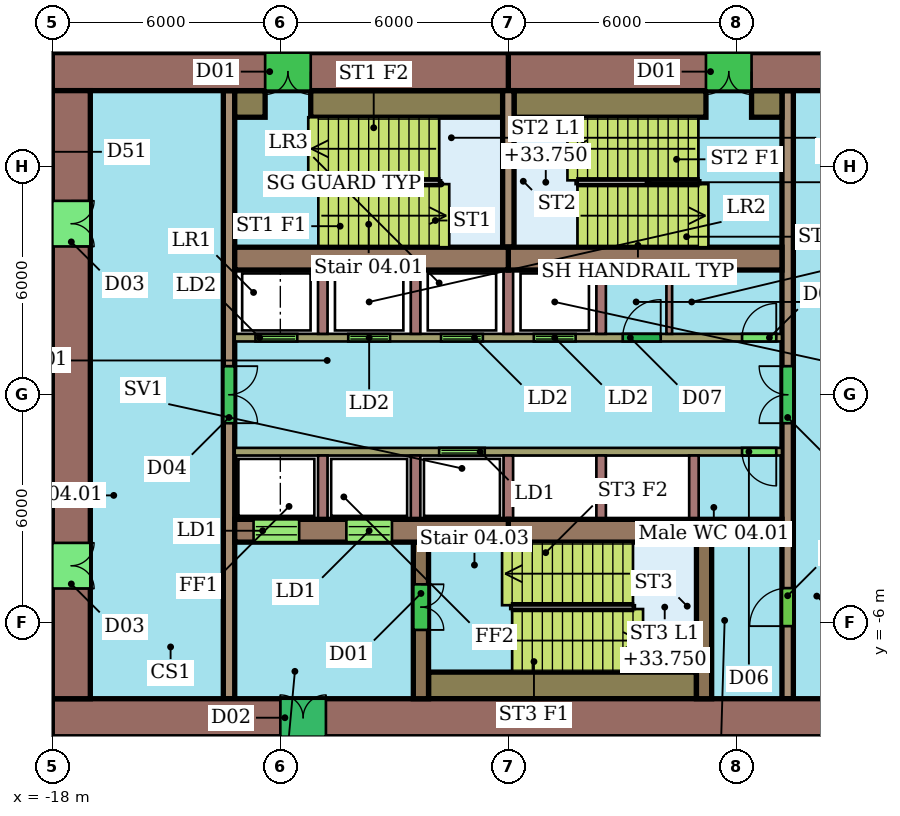
"""IFC4 building model, lengths in metres.
Left out: names, types, materials, properties, quantities, classifications, styles, units other than length and angle.
Written with IfcOpenShell. Run it as: python <this file> out.ifc"""

import sys

from ifc_helpers import new_model, si_unit, direction, frame, frame_2d, origin, place, context, subcontext, project, spatial, rectangle, extrude, element, fill, save


model = new_model("IFC4")
c1 = context("Model", 3, precision=1e-05, world=origin(), true_north=direction((0.0, 1.0)))
c2 = subcontext(c1, "Body", "Model", "MODEL_VIEW")
j1 = project(units=[si_unit("LENGTHUNIT", "METRE"), si_unit("PLANEANGLEUNIT", "RADIAN")], contexts=[c1])
p1 = place(None, origin())
s1 = spatial("IfcSite", under=j1, at=p1, CompositionType="ELEMENT")
p2 = place(p1, origin())
s2 = spatial("IfcBuilding", under=s1, at=p2, CompositionType="ELEMENT")
p3 = place(p2, frame((0.0, 0.0, 31.5)))
s3 = spatial("IfcBuildingStorey", under=s2, at=p3, CompositionType="ELEMENT", Elevation=31.5)
p4 = place(p3, frame((6.0, 8.5, 0.0), z_axis=(0.0, 0.0, 1.0), x_axis=(-1.0, 0.0, 0.0)))
e1 = element("IfcWall", 1, at=p4, inside=s3, PredefinedType="SHEAR", context=c2, shape_type="SweptSolid", body=[
    extrude(rectangle(XDim=12.0, YDim=1.0, at=frame_2d((6.0, 0.0))), origin(), (0.0, 0.0, 1.0), 4.2),
])
p5 = place(p4, frame((5.6, 0.0, 0.0)))
e2 = element("IfcOpeningElement", 2, at=p5, cuts=e1, PredefinedType="OPENING", context=c2, shape_type="SweptSolid", body=[
    extrude(rectangle(XDim=1.2, YDim=2.1, at=frame_2d((0.6, 1.05))), frame((0.0, 0.51, 0.0), z_axis=(0.0, -1.0, 0.0), x_axis=(1.0, 0.0, 0.0)), (0.0, 0.0, 1.0), 1.02),
])
p6 = place(p3, frame((-6.0, 8.5, 0.0), z_axis=(0.0, 0.0, 1.0), x_axis=(-1.0, 0.0, 0.0)))
e3 = element("IfcWall", 3, at=p6, inside=s3, PredefinedType="SHEAR", context=c2, shape_type="SweptSolid", body=[
    extrude(rectangle(XDim=12.0, YDim=1.0, at=frame_2d((6.0, 0.0))), origin(), (0.0, 0.0, 1.0), 4.2),
])
p7 = place(p6, frame((5.2, 0.0, 0.0)))
e4 = element("IfcOpeningElement", 4, at=p7, cuts=e3, PredefinedType="OPENING", context=c2, shape_type="SweptSolid", body=[
    extrude(rectangle(XDim=1.2, YDim=2.1, at=frame_2d((0.6, 1.05))), frame((0.0, 0.51, 0.0), z_axis=(0.0, -1.0, 0.0), x_axis=(1.0, 0.0, 0.0)), (0.0, 0.0, 1.0), 1.02),
])
p8 = place(p3, frame((-18.0, -8.5, 0.0), z_axis=(0.0, 0.0, 1.0), x_axis=(1.0, 0.0, 0.0)))
e5 = element("IfcWall", 5, at=p8, inside=s3, PredefinedType="SHEAR", context=c2, shape_type="SweptSolid", body=[
    extrude(rectangle(XDim=24.0, YDim=1.0, at=frame_2d((12.0, 0.0))), origin(), (0.0, 0.0, 1.0), 4.2),
])
p9 = place(p8, frame((6.0, 0.0, 0.0)))
e6 = element("IfcOpeningElement", 6, at=p9, cuts=e5, PredefinedType="OPENING", context=c2, shape_type="SweptSolid", body=[
    extrude(rectangle(XDim=1.2, YDim=2.1, at=frame_2d((0.6, 1.05))), frame((0.0, 0.51, 0.0), z_axis=(0.0, -1.0, 0.0), x_axis=(1.0, 0.0, 0.0)), (0.0, 0.0, 1.0), 1.02),
])
p10 = place(p3, frame((-17.5, 8.0, 0.0), z_axis=(0.0, 0.0, 1.0), x_axis=(0.0, -1.0, 0.0)))
e7 = element("IfcWall", 7, at=p10, inside=s3, PredefinedType="SHEAR", context=c2, shape_type="SweptSolid", body=[
    extrude(rectangle(XDim=16.0, YDim=1.0, at=frame_2d((8.0, 0.0))), origin(), (0.0, 0.0, 1.0), 4.2),
])
p11 = place(p10, frame((11.9, 0.0, 0.0)))
e8 = element("IfcOpeningElement", 8, at=p11, cuts=e7, PredefinedType="OPENING", context=c2, shape_type="SweptSolid", body=[
    extrude(rectangle(XDim=1.2, YDim=2.1, at=frame_2d((0.6, 1.05))), frame((0.0, 0.51, 0.0), z_axis=(0.0, -1.0, 0.0), x_axis=(1.0, 0.0, 0.0)), (0.0, 0.0, 1.0), 1.02),
])
p12 = place(p10, frame((2.9, 0.0, 0.0)))
e9 = element("IfcOpeningElement", 9, at=p12, cuts=e7, PredefinedType="OPENING", context=c2, shape_type="SweptSolid", body=[
    extrude(rectangle(XDim=1.2, YDim=2.1, at=frame_2d((0.6, 1.05))), frame((0.0, 0.51, 0.0), z_axis=(0.0, -1.0, 0.0), x_axis=(1.0, 0.0, 0.0)), (0.0, 0.0, 1.0), 1.02),
])
for number, where, z_axis, x_axis in (
    (10, (-13.2, 3.58, 0.0), (0.0, 0.0, 1.0), (1.0, 0.0, 0.0)),
    (11, (-6.0, 3.58, 0.0), (0.0, 0.0, 1.0), (1.0, 0.0, 0.0)),
):
    element("IfcWall", number, at=place(p3, frame(where, z_axis=z_axis, x_axis=x_axis)), inside=s3, PredefinedType="SHEAR", context=c2, shape_type="SweptSolid", body=[
        extrude(rectangle(XDim=7.2, YDim=0.6, at=frame_2d((3.6, 0.0))), origin(), (0.0, 0.0, 1.0), 4.2),
    ])
p13 = place(p3, frame((-13.2, -3.58, 0.0), z_axis=(0.0, 0.0, 1.0), x_axis=(1.0, 0.0, 0.0)))
e12 = element("IfcWall", 12, at=p13, inside=s3, PredefinedType="SHEAR", context=c2, shape_type="SweptSolid", body=[
    extrude(rectangle(XDim=7.2, YDim=0.6, at=frame_2d((3.6, 0.0))), origin(), (0.0, 0.0, 1.0), 4.2),
])
p14 = place(p13, frame((0.496, 0.0, 0.0)))
e13 = element("IfcOpeningElement", 13, at=p14, cuts=e12, PredefinedType="OPENING", context=c2, shape_type="SweptSolid", body=[
    extrude(rectangle(XDim=1.2, YDim=2.1, at=frame_2d((0.6, 1.05))), frame((0.0, 0.31, 0.0), z_axis=(0.0, -1.0, 0.0), x_axis=(1.0, 0.0, 0.0)), (0.0, 0.0, 1.0), 0.62),
])
p15 = place(p13, frame((2.938, 0.0, 0.0)))
e14 = element("IfcOpeningElement", 14, at=p15, cuts=e12, PredefinedType="OPENING", context=c2, shape_type="SweptSolid", body=[
    extrude(rectangle(XDim=1.2, YDim=2.1, at=frame_2d((0.6, 1.05))), frame((0.0, 0.31, 0.0), z_axis=(0.0, -1.0, 0.0), x_axis=(1.0, 0.0, 0.0)), (0.0, 0.0, 1.0), 0.62),
])
p16 = place(p3, frame((-6.0, -3.58, 0.0), z_axis=(0.0, 0.0, 1.0), x_axis=(1.0, 0.0, 0.0)))
e15 = element("IfcWall", 15, at=p16, inside=s3, PredefinedType="SHEAR", context=c2, shape_type="SweptSolid", body=[
    extrude(rectangle(XDim=7.2, YDim=0.6, at=frame_2d((3.6, 0.0))), origin(), (0.0, 0.0, 1.0), 4.2),
])
p17 = place(p3, frame((-13.35, 8.0, 0.0), z_axis=(0.0, 0.0, 1.0), x_axis=(0.0, -1.0, 0.0)))
e16 = element("IfcWall", 16, at=p17, inside=s3, PredefinedType="SHEAR", context=c2, shape_type="SweptSolid", body=[
    extrude(rectangle(XDim=16.0, YDim=0.3, at=frame_2d((8.0, 0.0))), origin(), (0.0, 0.0, 1.0), 4.2),
])
p18 = place(p17, frame((7.25, 0.0, 0.0)))
e17 = element("IfcOpeningElement", 17, at=p18, cuts=e16, PredefinedType="OPENING", context=c2, shape_type="SweptSolid", body=[
    extrude(rectangle(XDim=1.5, YDim=2.1, at=frame_2d((0.75, 1.05))), frame((0.0, 0.16, 0.0), z_axis=(0.0, -1.0, 0.0), x_axis=(1.0, 0.0, 0.0)), (0.0, 0.0, 1.0), 0.32),
])
p19 = place(p3, frame((1.35, -8.0, 0.0), z_axis=(0.0, 0.0, 1.0), x_axis=(0.0, 1.0, 0.0)))
e18 = element("IfcWall", 18, at=p19, inside=s3, PredefinedType="SHEAR", context=c2, shape_type="SweptSolid", body=[
    extrude(rectangle(XDim=16.0, YDim=0.3, at=frame_2d((8.0, 0.0))), origin(), (0.0, 0.0, 1.0), 4.2),
])
p20 = place(p19, frame((1.91, 0.0, 0.0)))
e19 = element("IfcOpeningElement", 19, at=p20, cuts=e18, PredefinedType="OPENING", context=c2, shape_type="SweptSolid", body=[
    extrude(rectangle(XDim=1.0, YDim=2.1, at=frame_2d((0.5, 1.05))), frame((0.0, 0.16, 0.0), z_axis=(0.0, -1.0, 0.0), x_axis=(1.0, 0.0, 0.0)), (0.0, 0.0, 1.0), 0.32),
])
p21 = place(p19, frame((7.25, 0.0, 0.0)))
e20 = element("IfcOpeningElement", 20, at=p21, cuts=e18, PredefinedType="OPENING", context=c2, shape_type="SweptSolid", body=[
    extrude(rectangle(XDim=1.5, YDim=2.1, at=frame_2d((0.75, 1.05))), frame((0.0, 0.16, 0.0), z_axis=(0.0, -1.0, 0.0), x_axis=(1.0, 0.0, 0.0)), (0.0, 0.0, 1.0), 0.32),
])
p22 = place(p3, frame((-13.2, 1.5, 0.0), z_axis=(0.0, 0.0, 1.0), x_axis=(1.0, 0.0, 0.0)))
e21 = element("IfcWall", 21, at=p22, inside=s3, PredefinedType="SHEAR", context=c2, shape_type="SweptSolid", body=[
    extrude(rectangle(XDim=14.4, YDim=0.2, at=frame_2d((7.2, 0.0))), origin(), (0.0, 0.0, 1.0), 4.2),
])
p23 = place(p22, frame((0.546, 0.0, 0.0)))
e22 = element("IfcOpeningElement", 22, at=p23, cuts=e21, PredefinedType="OPENING", context=c2, shape_type="SweptSolid", body=[
    extrude(rectangle(XDim=1.1, YDim=2.1, at=frame_2d((0.55, 1.05))), frame((0.0, 0.11, 0.0), z_axis=(0.0, -1.0, 0.0), x_axis=(1.0, 0.0, 0.0)), (0.0, 0.0, 1.0), 0.22),
])
p24 = place(p22, frame((2.988, 0.0, 0.0)))
e23 = element("IfcOpeningElement", 23, at=p24, cuts=e21, PredefinedType="OPENING", context=c2, shape_type="SweptSolid", body=[
    extrude(rectangle(XDim=1.1, YDim=2.1, at=frame_2d((0.55, 1.05))), frame((0.0, 0.11, 0.0), z_axis=(0.0, -1.0, 0.0), x_axis=(1.0, 0.0, 0.0)), (0.0, 0.0, 1.0), 0.22),
])
p25 = place(p22, frame((5.429, 0.0, 0.0)))
e24 = element("IfcOpeningElement", 24, at=p25, cuts=e21, PredefinedType="OPENING", context=c2, shape_type="SweptSolid", body=[
    extrude(rectangle(XDim=1.1, YDim=2.1, at=frame_2d((0.55, 1.05))), frame((0.0, 0.11, 0.0), z_axis=(0.0, -1.0, 0.0), x_axis=(1.0, 0.0, 0.0)), (0.0, 0.0, 1.0), 0.22),
])
p26 = place(p22, frame((7.871, 0.0, 0.0)))
e25 = element("IfcOpeningElement", 25, at=p26, cuts=e21, PredefinedType="OPENING", context=c2, shape_type="SweptSolid", body=[
    extrude(rectangle(XDim=1.1, YDim=2.1, at=frame_2d((0.55, 1.05))), frame((0.0, 0.11, 0.0), z_axis=(0.0, -1.0, 0.0), x_axis=(1.0, 0.0, 0.0)), (0.0, 0.0, 1.0), 0.22),
])
p27 = place(p22, frame((10.21, 0.0, 0.0)))
e26 = element("IfcOpeningElement", 26, at=p27, cuts=e21, PredefinedType="OPENING", context=c2, shape_type="SweptSolid", body=[
    extrude(rectangle(XDim=1.0, YDim=2.1, at=frame_2d((0.5, 1.05))), frame((0.0, 0.11, 0.0), z_axis=(0.0, -1.0, 0.0), x_axis=(1.0, 0.0, 0.0)), (0.0, 0.0, 1.0), 0.22),
])
p28 = place(p22, frame((13.35, 0.0, 0.0)))
e27 = element("IfcOpeningElement", 27, at=p28, cuts=e21, PredefinedType="OPENING", context=c2, shape_type="SweptSolid", body=[
    extrude(rectangle(XDim=0.9, YDim=2.1, at=frame_2d((0.45, 1.05))), frame((0.0, 0.11, 0.0), z_axis=(0.0, -1.0, 0.0), x_axis=(1.0, 0.0, 0.0)), (0.0, 0.0, 1.0), 0.22),
])
p29 = place(p3, frame((1.2, -1.5, 0.0), z_axis=(0.0, 0.0, 1.0), x_axis=(-1.0, 0.0, 0.0)))
e28 = element("IfcWall", 28, at=p29, inside=s3, PredefinedType="SHEAR", context=c2, shape_type="SweptSolid", body=[
    extrude(rectangle(XDim=14.4, YDim=0.2, at=frame_2d((7.2, 0.0))), origin(), (0.0, 0.0, 1.0), 4.2),
])
p30 = place(p29, frame((7.821, 0.0, 0.0)))
e29 = element("IfcOpeningElement", 29, at=p30, cuts=e28, PredefinedType="OPENING", context=c2, shape_type="SweptSolid", body=[
    extrude(rectangle(XDim=1.2, YDim=2.1, at=frame_2d((0.6, 1.05))), frame((0.0, 0.11, 0.0), z_axis=(0.0, -1.0, 0.0), x_axis=(1.0, 0.0, 0.0)), (0.0, 0.0, 1.0), 0.22),
])
p31 = place(p29, frame((0.15, 0.0, 0.0)))
e30 = element("IfcOpeningElement", 30, at=p31, cuts=e28, PredefinedType="OPENING", context=c2, shape_type="SweptSolid", body=[
    extrude(rectangle(XDim=0.9, YDim=2.1, at=frame_2d((0.45, 1.05))), frame((0.0, 0.11, 0.0), z_axis=(0.0, -1.0, 0.0), x_axis=(1.0, 0.0, 0.0)), (0.0, 0.0, 1.0), 0.22),
])
p32 = place(p3, frame((-8.3, -3.88, 0.0), z_axis=(0.0, 0.0, 1.0), x_axis=(0.0, -1.0, 0.0)))
e31 = element("IfcWall", 31, at=p32, inside=s3, PredefinedType="SHEAR", context=c2, shape_type="SweptSolid", body=[
    extrude(rectangle(XDim=4.12, YDim=0.4, at=frame_2d((2.06, 0.0))), origin(), (0.0, 0.0, 1.0), 4.2),
])
p33 = place(p32, frame((1.11, 0.0, 0.0)))
e32 = element("IfcOpeningElement", 32, at=p33, cuts=e31, PredefinedType="OPENING", context=c2, shape_type="SweptSolid", body=[
    extrude(rectangle(XDim=1.2, YDim=2.1, at=frame_2d((0.6, 1.05))), frame((0.0, 0.21, 0.0), z_axis=(0.0, -1.0, 0.0), x_axis=(1.0, 0.0, 0.0)), (0.0, 0.0, 1.0), 0.42),
])
p34 = place(p3, frame((-0.85, -3.88, 0.0), z_axis=(0.0, 0.0, 1.0), x_axis=(0.0, -1.0, 0.0)))
e33 = element("IfcWall", 33, at=p34, inside=s3, PredefinedType="SHEAR", context=c2, shape_type="SweptSolid", body=[
    extrude(rectangle(XDim=4.12, YDim=0.4, at=frame_2d((2.06, 0.0))), origin(), (0.0, 0.0, 1.0), 4.2),
])
p35 = place(p3, frame((-6.0, 3.88, 0.0), z_axis=(0.0, 0.0, 1.0), x_axis=(0.0, 1.0, 0.0)))
e34 = element("IfcWall", 34, at=p35, inside=s3, PredefinedType="SHEAR", context=c2, shape_type="SweptSolid", body=[
    extrude(rectangle(XDim=4.12, YDim=0.3, at=frame_2d((2.06, 0.0))), origin(), (0.0, 0.0, 1.0), 4.2),
])
p36 = place(p3, frame((-13.2, 7.65, 0.0), z_axis=(0.0, 0.0, 1.0), x_axis=(1.0, 0.0, 0.0)))
e35 = element("IfcWall", 35, at=p36, inside=s3, PredefinedType="SHEAR", context=c2, shape_type="SweptSolid", body=[
    extrude(rectangle(XDim=0.8, YDim=0.7, at=frame_2d((0.4, 0.0))), origin(), (0.0, 0.0, 1.0), 4.2),
])
for number, where, z_axis, x_axis in (
    (36, (-11.2, 7.65, 0.0), (0.0, 0.0, 1.0), (1.0, 0.0, 0.0)),
    (37, (-5.85, 7.65, 0.0), (0.0, 0.0, 1.0), (1.0, 0.0, 0.0)),
):
    element("IfcWall", number, at=place(p3, frame(where, z_axis=z_axis, x_axis=x_axis)), inside=s3, PredefinedType="SHEAR", context=c2, shape_type="SweptSolid", body=[
        extrude(rectangle(XDim=5.05, YDim=0.7, at=frame_2d((2.525, 0.0))), origin(), (0.0, 0.0, 1.0), 4.2),
    ])
p37 = place(p3, frame((0.4, 7.65, 0.0), z_axis=(0.0, 0.0, 1.0), x_axis=(1.0, 0.0, 0.0)))
e38 = element("IfcWall", 38, at=p37, inside=s3, PredefinedType="SHEAR", context=c2, shape_type="SweptSolid", body=[
    extrude(rectangle(XDim=0.8, YDim=0.7, at=frame_2d((0.4, 0.0))), origin(), (0.0, 0.0, 1.0), 4.2),
])
p38 = place(p3, frame((-8.1, -7.65, 0.0), z_axis=(0.0, 0.0, 1.0), x_axis=(1.0, 0.0, 0.0)))
e39 = element("IfcWall", 39, at=p38, inside=s3, PredefinedType="SHEAR", context=c2, shape_type="SweptSolid", body=[
    extrude(rectangle(XDim=7.05, YDim=0.7, at=frame_2d((3.525, 0.0))), origin(), (0.0, 0.0, 1.0), 4.2),
])
for number, where, z_axis, x_axis in (
    (40, (-10.883, 1.6, 0.0), (0.0, 0.0, 1.0), (0.0, 1.0, 0.0)),
    (41, (-8.442, 1.6, 0.0), (0.0, 0.0, 1.0), (0.0, 1.0, 0.0)),
    (42, (-6.0, 1.6, 0.0), (0.0, 0.0, 1.0), (0.0, 1.0, 0.0)),
    (43, (-3.558, 1.6, 0.0), (0.0, 0.0, 1.0), (0.0, 1.0, 0.0)),
):
    element("IfcWall", number, at=place(p3, frame(where, z_axis=z_axis, x_axis=x_axis)), inside=s3, PredefinedType="SHEAR", context=c2, shape_type="SweptSolid", body=[
        extrude(rectangle(XDim=1.68, YDim=0.25, at=frame_2d((0.84, 0.0))), origin(), (0.0, 0.0, 1.0), 4.2),
    ])
p39 = place(p3, frame((-1.765, 1.6, 0.0), z_axis=(0.0, 0.0, 1.0), x_axis=(0.0, 1.0, 0.0)))
e44 = element("IfcWall", 44, at=p39, inside=s3, PredefinedType="PARTITIONING", context=c2, shape_type="SweptSolid", body=[
    extrude(rectangle(XDim=1.68, YDim=0.15, at=frame_2d((0.84, 0.0))), origin(), (0.0, 0.0, 1.0), 4.2),
])
for number, where, z_axis, x_axis in (
    (45, (-10.883, -1.6, 0.0), (0.0, 0.0, 1.0), (0.0, -1.0, 0.0)),
    (46, (-8.442, -1.6, 0.0), (0.0, 0.0, 1.0), (0.0, -1.0, 0.0)),
    (47, (-6.0, -1.6, 0.0), (0.0, 0.0, 1.0), (0.0, -1.0, 0.0)),
    (48, (-3.558, -1.6, 0.0), (0.0, 0.0, 1.0), (0.0, -1.0, 0.0)),
    (49, (-1.117, -1.6, 0.0), (0.0, 0.0, 1.0), (0.0, -1.0, 0.0)),
):
    element("IfcWall", number, at=place(p3, frame(where, z_axis=z_axis, x_axis=x_axis)), inside=s3, PredefinedType="SHEAR", context=c2, shape_type="SweptSolid", body=[
        extrude(rectangle(XDim=1.68, YDim=0.25, at=frame_2d((0.84, 0.0))), origin(), (0.0, 0.0, 1.0), 4.2),
    ])
p40 = place(p5, origin())
e50 = element("IfcDoor", 50, at=p40, inside=s3, OperationType="DOUBLE_DOOR_SINGLE_SWING", PredefinedType="NOTDEFINED", context=c2, shape_type="SweptSolid", body=[
    extrude(rectangle(XDim=1.2, YDim=2.1, at=frame_2d((0.6, 1.05))), frame((0.0, 0.025, 0.0), z_axis=(0.0, -1.0, 0.0), x_axis=(1.0, 0.0, 0.0)), (0.0, 0.0, 1.0), 0.05),
])
fill(e2, e50)
p41 = place(p7, origin())
e51 = element("IfcDoor", 51, at=p41, inside=s3, OperationType="DOUBLE_DOOR_SINGLE_SWING", PredefinedType="NOTDEFINED", context=c2, shape_type="SweptSolid", body=[
    extrude(rectangle(XDim=1.2, YDim=2.1, at=frame_2d((0.6, 1.05))), frame((0.0, 0.025, 0.0), z_axis=(0.0, -1.0, 0.0), x_axis=(1.0, 0.0, 0.0)), (0.0, 0.0, 1.0), 0.05),
])
fill(e4, e51)
p42 = place(p9, origin())
e52 = element("IfcDoor", 52, at=p42, inside=s3, OperationType="DOUBLE_DOOR_SINGLE_SWING", PredefinedType="NOTDEFINED", context=c2, shape_type="SweptSolid", body=[
    extrude(rectangle(XDim=1.2, YDim=2.1, at=frame_2d((0.6, 1.05))), frame((0.0, 0.025, 0.0), z_axis=(0.0, -1.0, 0.0), x_axis=(1.0, 0.0, 0.0)), (0.0, 0.0, 1.0), 0.05),
])
fill(e6, e52)
p43 = place(p11, origin())
e53 = element("IfcDoor", 53, at=p43, inside=s3, OperationType="DOUBLE_DOOR_SINGLE_SWING", PredefinedType="NOTDEFINED", context=c2, shape_type="SweptSolid", body=[
    extrude(rectangle(XDim=1.2, YDim=2.1, at=frame_2d((0.6, 1.05))), frame((0.0, 0.025, 0.0), z_axis=(0.0, -1.0, 0.0), x_axis=(1.0, 0.0, 0.0)), (0.0, 0.0, 1.0), 0.05),
])
fill(e8, e53)
p44 = place(p12, origin())
e54 = element("IfcDoor", 54, at=p44, inside=s3, OperationType="DOUBLE_DOOR_SINGLE_SWING", PredefinedType="NOTDEFINED", context=c2, shape_type="SweptSolid", body=[
    extrude(rectangle(XDim=1.2, YDim=2.1, at=frame_2d((0.6, 1.05))), frame((0.0, 0.025, 0.0), z_axis=(0.0, -1.0, 0.0), x_axis=(1.0, 0.0, 0.0)), (0.0, 0.0, 1.0), 0.05),
])
fill(e9, e54)
p45 = place(p14, origin())
e55 = element("IfcDoor", 55, at=p45, inside=s3, OperationType="DOUBLE_DOOR_SLIDING", PredefinedType="NOTDEFINED", context=c2, shape_type="SweptSolid", body=[
    extrude(rectangle(XDim=1.2, YDim=2.1, at=frame_2d((0.6, 1.05))), frame((0.0, 0.025, 0.0), z_axis=(0.0, -1.0, 0.0), x_axis=(1.0, 0.0, 0.0)), (0.0, 0.0, 1.0), 0.05),
])
fill(e13, e55)
p46 = place(p15, origin())
e56 = element("IfcDoor", 56, at=p46, inside=s3, OperationType="DOUBLE_DOOR_SLIDING", PredefinedType="NOTDEFINED", context=c2, shape_type="SweptSolid", body=[
    extrude(rectangle(XDim=1.2, YDim=2.1, at=frame_2d((0.6, 1.05))), frame((0.0, 0.025, 0.0), z_axis=(0.0, -1.0, 0.0), x_axis=(1.0, 0.0, 0.0)), (0.0, 0.0, 1.0), 0.05),
])
fill(e14, e56)
p47 = place(p18, origin())
e57 = element("IfcDoor", 57, at=p47, inside=s3, OperationType="DOUBLE_DOOR_SINGLE_SWING", PredefinedType="NOTDEFINED", context=c2, shape_type="SweptSolid", body=[
    extrude(rectangle(XDim=1.5, YDim=2.1, at=frame_2d((0.75, 1.05))), frame((0.0, 0.025, 0.0), z_axis=(0.0, -1.0, 0.0), x_axis=(1.0, 0.0, 0.0)), (0.0, 0.0, 1.0), 0.05),
])
fill(e17, e57)
p48 = place(p20, origin())
e58 = element("IfcDoor", 58, at=p48, inside=s3, OperationType="SINGLE_SWING_LEFT", PredefinedType="NOTDEFINED", context=c2, shape_type="SweptSolid", body=[
    extrude(rectangle(XDim=1.0, YDim=2.1, at=frame_2d((0.5, 1.05))), frame((0.0, 0.025, 0.0), z_axis=(0.0, -1.0, 0.0), x_axis=(1.0, 0.0, 0.0)), (0.0, 0.0, 1.0), 0.05),
])
fill(e19, e58)
p49 = place(p21, origin())
e59 = element("IfcDoor", 59, at=p49, inside=s3, OperationType="DOUBLE_DOOR_SINGLE_SWING", PredefinedType="NOTDEFINED", context=c2, shape_type="SweptSolid", body=[
    extrude(rectangle(XDim=1.5, YDim=2.1, at=frame_2d((0.75, 1.05))), frame((0.0, 0.025, 0.0), z_axis=(0.0, -1.0, 0.0), x_axis=(1.0, 0.0, 0.0)), (0.0, 0.0, 1.0), 0.05),
])
fill(e20, e59)
p50 = place(p23, origin())
e60 = element("IfcDoor", 60, at=p50, inside=s3, OperationType="DOUBLE_DOOR_SLIDING", PredefinedType="NOTDEFINED", context=c2, shape_type="SweptSolid", body=[
    extrude(rectangle(XDim=1.1, YDim=2.1, at=frame_2d((0.55, 1.05))), frame((0.0, 0.025, 0.0), z_axis=(0.0, -1.0, 0.0), x_axis=(1.0, 0.0, 0.0)), (0.0, 0.0, 1.0), 0.05),
])
fill(e22, e60)
p51 = place(p24, origin())
e61 = element("IfcDoor", 61, at=p51, inside=s3, OperationType="DOUBLE_DOOR_SLIDING", PredefinedType="NOTDEFINED", context=c2, shape_type="SweptSolid", body=[
    extrude(rectangle(XDim=1.1, YDim=2.1, at=frame_2d((0.55, 1.05))), frame((0.0, 0.025, 0.0), z_axis=(0.0, -1.0, 0.0), x_axis=(1.0, 0.0, 0.0)), (0.0, 0.0, 1.0), 0.05),
])
fill(e23, e61)
p52 = place(p25, origin())
e62 = element("IfcDoor", 62, at=p52, inside=s3, OperationType="DOUBLE_DOOR_SLIDING", PredefinedType="NOTDEFINED", context=c2, shape_type="SweptSolid", body=[
    extrude(rectangle(XDim=1.1, YDim=2.1, at=frame_2d((0.55, 1.05))), frame((0.0, 0.025, 0.0), z_axis=(0.0, -1.0, 0.0), x_axis=(1.0, 0.0, 0.0)), (0.0, 0.0, 1.0), 0.05),
])
fill(e24, e62)
p53 = place(p26, origin())
e63 = element("IfcDoor", 63, at=p53, inside=s3, OperationType="DOUBLE_DOOR_SLIDING", PredefinedType="NOTDEFINED", context=c2, shape_type="SweptSolid", body=[
    extrude(rectangle(XDim=1.1, YDim=2.1, at=frame_2d((0.55, 1.05))), frame((0.0, 0.025, 0.0), z_axis=(0.0, -1.0, 0.0), x_axis=(1.0, 0.0, 0.0)), (0.0, 0.0, 1.0), 0.05),
])
fill(e25, e63)
p54 = place(p27, origin())
e64 = element("IfcDoor", 64, at=p54, inside=s3, OperationType="SINGLE_SWING_RIGHT", PredefinedType="NOTDEFINED", context=c2, shape_type="SweptSolid", body=[
    extrude(rectangle(XDim=1.0, YDim=2.1, at=frame_2d((0.5, 1.05))), frame((0.0, 0.025, 0.0), z_axis=(0.0, -1.0, 0.0), x_axis=(1.0, 0.0, 0.0)), (0.0, 0.0, 1.0), 0.05),
])
fill(e26, e64)
p55 = place(p28, origin())
e65 = element("IfcDoor", 65, at=p55, inside=s3, OperationType="SINGLE_SWING_RIGHT", PredefinedType="NOTDEFINED", context=c2, shape_type="SweptSolid", body=[
    extrude(rectangle(XDim=0.9, YDim=2.1, at=frame_2d((0.45, 1.05))), frame((0.0, 0.025, 0.0), z_axis=(0.0, -1.0, 0.0), x_axis=(1.0, 0.0, 0.0)), (0.0, 0.0, 1.0), 0.05),
])
fill(e27, e65)
p56 = place(p30, origin())
e66 = element("IfcDoor", 66, at=p56, inside=s3, OperationType="DOUBLE_DOOR_SLIDING", PredefinedType="NOTDEFINED", context=c2, shape_type="SweptSolid", body=[
    extrude(rectangle(XDim=1.2, YDim=2.1, at=frame_2d((0.6, 1.05))), frame((0.0, 0.025, 0.0), z_axis=(0.0, -1.0, 0.0), x_axis=(1.0, 0.0, 0.0)), (0.0, 0.0, 1.0), 0.05),
])
fill(e29, e66)
p57 = place(p31, origin())
e67 = element("IfcDoor", 67, at=p57, inside=s3, OperationType="SINGLE_SWING_LEFT", PredefinedType="NOTDEFINED", context=c2, shape_type="SweptSolid", body=[
    extrude(rectangle(XDim=0.9, YDim=2.1, at=frame_2d((0.45, 1.05))), frame((0.0, 0.025, 0.0), z_axis=(0.0, -1.0, 0.0), x_axis=(1.0, 0.0, 0.0)), (0.0, 0.0, 1.0), 0.05),
])
fill(e30, e67)
p58 = place(p33, origin())
e68 = element("IfcDoor", 68, at=p58, inside=s3, OperationType="DOUBLE_DOOR_SINGLE_SWING", PredefinedType="NOTDEFINED", context=c2, shape_type="SweptSolid", body=[
    extrude(rectangle(XDim=1.2, YDim=2.1, at=frame_2d((0.6, 1.05))), frame((0.0, 0.025, 0.0), z_axis=(0.0, -1.0, 0.0), x_axis=(1.0, 0.0, 0.0)), (0.0, 0.0, 1.0), 0.05),
])
fill(e32, e68)
save(model, sys.argv[1])
